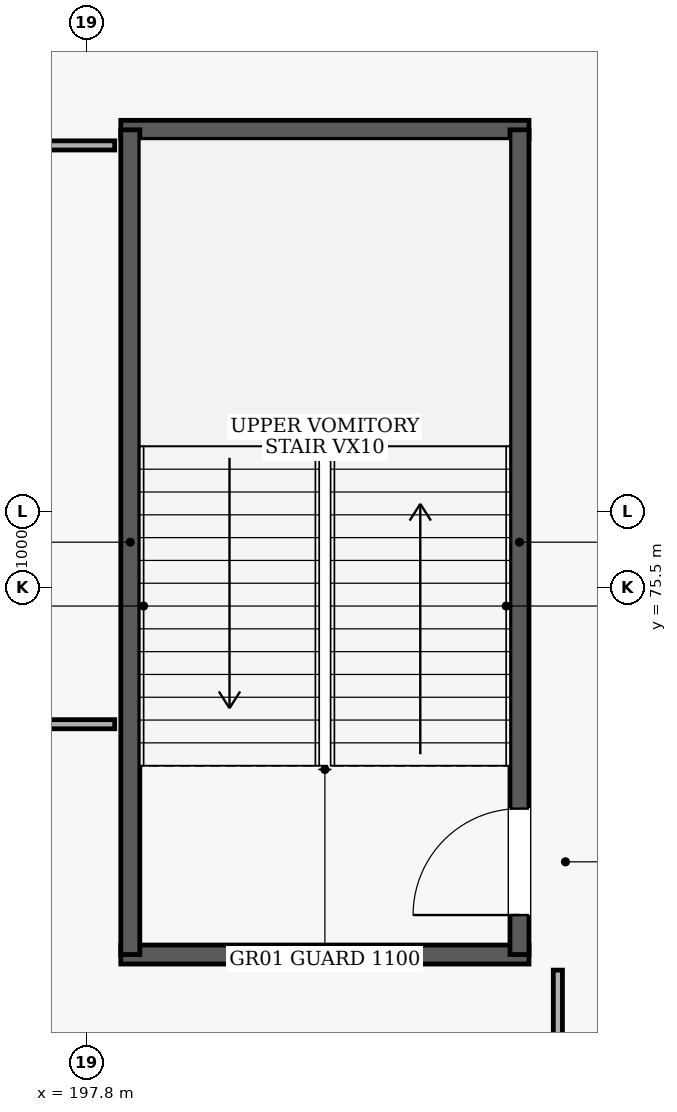
"""IFC4 building model, lengths in metres.
Left out: names, types, materials, properties, quantities, classifications, styles, units other than length and angle.
Written with IfcOpenShell. Run it as: python <this file> out.ifc"""

import sys

from ifc_helpers import new_model, si_unit, direction, frame, frame_2d, origin, place, context, subcontext, project, spatial, rectangle, extrude, element, fill, save


model = new_model("IFC4")
c1 = context("Model", 3, precision=1e-05, world=origin(), true_north=direction((0.0, 1.0)))
c2 = subcontext(c1, "Body", "Model", "MODEL_VIEW")
j1 = project(units=[si_unit("LENGTHUNIT", "METRE"), si_unit("PLANEANGLEUNIT", "RADIAN")], contexts=[c1])
p1 = place(None, origin())
s1 = spatial("IfcSite", under=j1, at=p1, CompositionType="ELEMENT")
p2 = place(p1, origin())
s2 = spatial("IfcBuilding", under=s1, at=p2, CompositionType="ELEMENT")
p3 = place(p2, frame((0.0, 0.0, 10.2)))
s3 = spatial("IfcBuildingStorey", under=s2, at=p3, CompositionType="ELEMENT", Elevation=10.2)
for number, where, z_axis, x_axis in (
    (1, (198.25, 70.675, 0.0), (0.0, 0.0, 1.0), (1.0, 0.0, 0.0)),
    (2, (203.62, 81.525, 0.0), (0.0, 0.0, 1.0), (-1.0, 0.0, 0.0)),
):
    element("IfcWall", number, at=place(p3, frame(where, z_axis=z_axis, x_axis=x_axis)), inside=s3, PredefinedType="SHEAR", context=c2, shape_type="SweptSolid", body=[
        extrude(rectangle(XDim=5.37, YDim=0.25, at=frame_2d((2.685, 0.0))), origin(), (0.0, 0.0, 1.0), 4.48),
    ])
p4 = place(p3, frame((198.375, 70.675, 0.0), z_axis=(0.0, 0.0, 1.0), x_axis=(0.0, 1.0, 0.0)))
e3 = element("IfcWall", 3, at=p4, inside=s3, PredefinedType="SHEAR", context=c2, shape_type="SweptSolid", body=[
    extrude(rectangle(XDim=10.85, YDim=0.25, at=frame_2d((5.425, 0.0))), origin(), (0.0, 0.0, 1.0), 4.48),
])
p5 = place(p3, frame((203.495, 70.675, 0.0), z_axis=(0.0, 0.0, 1.0), x_axis=(0.0, 1.0, 0.0)))
e4 = element("IfcWall", 4, at=p5, inside=s3, PredefinedType="SHEAR", context=c2, shape_type="SweptSolid", body=[
    extrude(rectangle(XDim=10.85, YDim=0.25, at=frame_2d((5.425, 0.0))), origin(), (0.0, 0.0, 1.0), 4.48),
])
p6 = place(p5, frame((0.52, 0.0, 0.0)))
e5 = element("IfcOpeningElement", 5, at=p6, cuts=e4, PredefinedType="OPENING", context=c2, shape_type="SweptSolid", body=[
    extrude(rectangle(XDim=1.4, YDim=2.15, at=frame_2d((0.7, 1.075))), frame((0.0, 0.135, 0.0), z_axis=(0.0, -1.0, 0.0), x_axis=(1.0, 0.0, 0.0)), (0.0, 0.0, 1.0), 0.27),
])
p7 = place(p3, frame((204.0, 67.33, 0.0), z_axis=(0.0, 0.0, 1.0), x_axis=(0.0, 1.0, 0.0)))
e6 = element("IfcWall", 6, at=p7, inside=s3, PredefinedType="PARTITIONING", context=c2, shape_type="SweptSolid", body=[
    extrude(rectangle(XDim=3.14, YDim=0.12, at=frame_2d((1.57, 0.0))), origin(), (0.0, 0.0, 1.0), 4.48),
])
p8 = place(p7, frame((0.97, 0.0, 0.0)))
e7 = element("IfcOpeningElement", 7, at=p8, cuts=e6, PredefinedType="OPENING", context=c2, shape_type="SweptSolid", body=[
    extrude(rectangle(XDim=1.2, YDim=2.15, at=frame_2d((0.6, 1.075))), frame((0.0, 0.07, 0.0), z_axis=(0.0, -1.0, 0.0), x_axis=(1.0, 0.0, 0.0)), (0.0, 0.0, 1.0), 0.14),
])
p9 = place(p3, frame((183.4, 73.705, 0.0), z_axis=(0.0, 0.0, 1.0), x_axis=(1.0, 0.0, 0.0)))
e8 = element("IfcWall", 8, at=p9, inside=s3, PredefinedType="PARTITIONING", context=c2, shape_type="SweptSolid", body=[
    extrude(rectangle(XDim=14.77, YDim=0.12, at=frame_2d((7.385, 0.0))), origin(), (0.0, 0.0, 1.0), 4.48),
])
p10 = place(p3, frame((198.17, 81.32, 0.0), z_axis=(0.0, 0.0, 1.0), x_axis=(-1.0, 0.0, 0.0)))
e9 = element("IfcWall", 9, at=p10, inside=s3, PredefinedType="PARTITIONING", context=c2, shape_type="SweptSolid", body=[
    extrude(rectangle(XDim=14.77, YDim=0.12, at=frame_2d((7.385, 0.0))), origin(), (0.0, 0.0, 1.0), 4.48),
])
p11 = place(p10, frame((5.713, 0.0, 0.0)))
e10 = element("IfcOpeningElement", 10, at=p11, cuts=e9, PredefinedType="OPENING", context=c2, shape_type="SweptSolid", body=[
    extrude(rectangle(XDim=1.3, YDim=2.2, at=frame_2d((0.65, 1.1))), frame((0.0, 0.07, 0.0), z_axis=(0.0, -1.0, 0.0), x_axis=(1.0, 0.0, 0.0)), (0.0, 0.0, 1.0), 0.14),
])
p12 = place(p6, origin())
e11 = element("IfcDoor", 11, at=p12, inside=s3, OperationType="SINGLE_SWING_LEFT", PredefinedType="DOOR", context=c2, shape_type="SweptSolid", body=[
    extrude(rectangle(XDim=1.4, YDim=2.15, at=frame_2d((0.7, 1.075))), frame((0.0, 0.025, 0.0), z_axis=(0.0, -1.0, 0.0), x_axis=(1.0, 0.0, 0.0)), (0.0, 0.0, 1.0), 0.05),
])
fill(e5, e11)
save(model, sys.argv[1])
